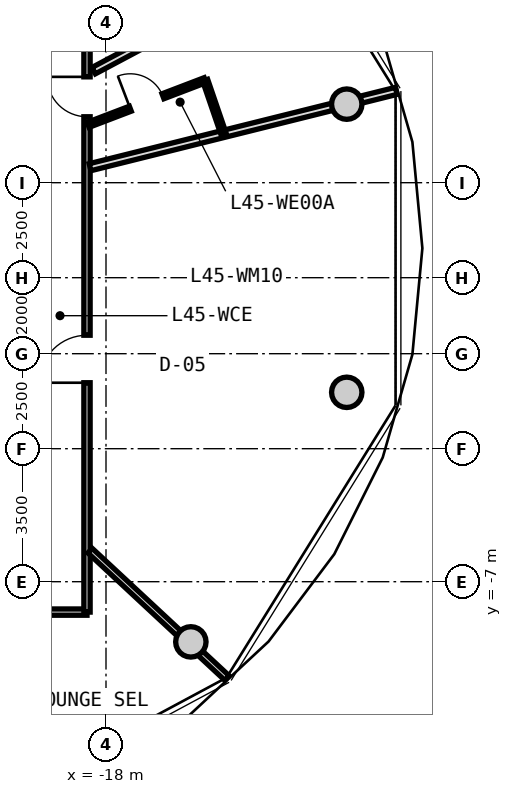
"""IFC4 building model, lengths in metres.
Left out: names, types, materials, properties, quantities, classifications, styles, units other than length and angle.
Written with IfcOpenShell. Run it as: python <this file> out.ifc"""

import sys

from ifc_helpers import new_model, si_unit, direction, frame, frame_2d, origin, origin_2d, place, context, subcontext, project, spatial, rectangle, circle, extrude, source, transform, mapped, element, fill, save


model = new_model("IFC4")
c1 = context("Model", 3, precision=1e-05, world=origin(), true_north=direction((0.0, 1.0)))
c2 = subcontext(c1, "Body", "Model", "MODEL_VIEW")
j1 = project(units=[si_unit("LENGTHUNIT", "METRE"), si_unit("PLANEANGLEUNIT", "RADIAN")], contexts=[c1])
p1 = place(None, origin())
s1 = spatial("IfcSite", under=j1, at=p1, CompositionType="ELEMENT")
p2 = place(p1, origin())
s2 = spatial("IfcBuilding", under=s1, at=p2, CompositionType="ELEMENT")
p3 = place(p2, frame((0.0, 0.0, 146.5)))
s3 = spatial("IfcBuildingStorey", under=s2, at=p3, CompositionType="ELEMENT", Elevation=146.5)
m1 = source(origin(), c2, "Body", "SweptSolid", [
    extrude(circle(Radius=0.4, at=origin_2d()), origin(), (0.0, 0.0, 1.0), 3.05),
])
for number, where, z_axis, x_axis in (
    (1, (-11.665, 5.567, 0.0), (0.0, 0.0, 1.0), (1.0, 0.0, 0.0)),
    (2, (-15.767, -8.584, 0.0), (0.0, 0.0, 1.0), (1.0, 0.0, 0.0)),
    (3, (-11.665, -2.016, 0.0), (0.0, 0.0, 1.0), (1.0, 0.0, 0.0)),
):
    element("IfcColumn", number, at=place(p3, frame(where, z_axis=z_axis, x_axis=x_axis)), inside=s3, PredefinedType="COLUMN", context=c2, shape_type="MappedRepresentation", body=[
        mapped(m1, transform((0.0, 0.0, 0.0), x_axis=(1.0, 0.0, 0.0), y_axis=(0.0, 1.0, 0.0), z_axis=(0.0, 0.0, 1.0), scale=1.0)),
    ])
m2 = source(origin(), c2, "Body", "SweptSolid", [
    extrude(rectangle(XDim=8.6, YDim=0.165, at=frame_2d((4.3, 0.0))), origin(), (0.0, 0.0, 1.0), 2.795),
])
p4 = place(p3, frame((-18.5, -7.8, 0.0), z_axis=(0.0, 0.0, 1.0), x_axis=(-1.0, 0.0, 0.0)))
e4 = element("IfcWall", 4, at=p4, inside=s3, PredefinedType="PARTITIONING", context=c2, shape_type="MappedRepresentation", body=[
    mapped(m2, transform((0.0, 0.0, 0.0), x_axis=(1.0, 0.0, 0.0), y_axis=(0.0, 1.0, 0.0), z_axis=(0.0, 0.0, 1.0), scale=1.0)),
])
p5 = place(p4, frame((3.775, 0.0, 0.0)))
e5 = element("IfcOpeningElement", 5, at=p5, cuts=e4, PredefinedType="OPENING", context=c2, shape_type="SweptSolid", body=[
    extrude(rectangle(XDim=1.05, YDim=2.15, at=frame_2d((0.525, 1.075))), frame((0.0, 0.093, 0.0), z_axis=(0.0, -1.0, 0.0), x_axis=(1.0, 0.0, 0.0)), (0.0, 0.0, 1.0), 0.185),
])
m3 = source(origin(), c2, "Body", "SweptSolid", [
    extrude(rectangle(XDim=15.6, YDim=0.165, at=frame_2d((7.8, 0.0))), origin(), (0.0, 0.0, 1.0), 2.795),
])
p6 = place(p3, frame((-18.5, 7.8, 0.0), z_axis=(0.0, 0.0, 1.0), x_axis=(0.0, -1.0, 0.0)))
e6 = element("IfcWall", 6, at=p6, inside=s3, PredefinedType="PARTITIONING", context=c2, shape_type="MappedRepresentation", body=[
    mapped(m3, transform((0.0, 0.0, 0.0), x_axis=(1.0, 0.0, 0.0), y_axis=(0.0, 1.0, 0.0), z_axis=(0.0, 0.0, 1.0), scale=1.0)),
])
p7 = place(p6, frame((8.314, 0.0, 0.0)))
e7 = element("IfcOpeningElement", 7, at=p7, cuts=e6, PredefinedType="OPENING", context=c2, shape_type="SweptSolid", body=[
    extrude(rectangle(XDim=1.25, YDim=2.2, at=frame_2d((0.625, 1.1))), frame((0.0, 0.093, 0.0), z_axis=(0.0, -1.0, 0.0), x_axis=(1.0, 0.0, 0.0)), (0.0, 0.0, 1.0), 0.185),
])
p8 = place(p6, frame((1.515, 0.0, 0.0)))
e8 = element("IfcOpeningElement", 8, at=p8, cuts=e6, PredefinedType="OPENING", context=c2, shape_type="SweptSolid", body=[
    extrude(rectangle(XDim=1.05, YDim=2.15, at=frame_2d((0.525, 1.075))), frame((0.0, 0.093, 0.0), z_axis=(0.0, -1.0, 0.0), x_axis=(1.0, 0.0, 0.0)), (0.0, 0.0, 1.0), 0.185),
])
m4 = source(origin(), c2, "Body", "SweptSolid", [
    extrude(rectangle(XDim=4.927, YDim=0.165, at=frame_2d((2.463, 0.0))), origin(), (0.0, 0.0, 1.0), 2.345),
])
p9 = place(p3, frame((-18.42, -6.183, 0.0), z_axis=(0.0, 0.0, 1.0), x_axis=(0.732191335987, -0.681098999783, 0.0)))
e9 = element("IfcWall", 9, at=p9, inside=s3, PredefinedType="PARTITIONING", context=c2, shape_type="MappedRepresentation", body=[
    mapped(m4, transform((0.0, 0.0, 0.0), x_axis=(1.0, 0.0, 0.0), y_axis=(0.0, 1.0, 0.0), z_axis=(0.0, 0.0, 1.0), scale=1.0)),
])
m5 = source(origin(), c2, "Body", "SweptSolid", [
    extrude(rectangle(XDim=8.305, YDim=0.19, at=frame_2d((4.153, 0.0))), origin(), (0.0, 0.0, 1.0), 2.345),
])
p10 = place(p3, frame((-18.42, 3.908, 0.0), z_axis=(0.0, 0.0, 1.0), x_axis=(0.970309994378, 0.241864662175, 0.0)))
e10 = element("IfcWall", 10, at=p10, inside=s3, PredefinedType="PARTITIONING", context=c2, shape_type="MappedRepresentation", body=[
    mapped(m5, transform((0.0, 0.0, 0.0), x_axis=(1.0, 0.0, 0.0), y_axis=(0.0, 1.0, 0.0), z_axis=(0.0, 0.0, 1.0), scale=1.0)),
])
m6 = source(origin(), c2, "Body", "SweptSolid", [
    extrude(rectangle(XDim=6.499, YDim=0.19, at=frame_2d((3.25, 0.0))), origin(), (0.0, 0.0, 1.0), 2.795),
])
p11 = place(p3, frame((-18.324, 6.449, 0.0), z_axis=(0.0, 0.0, 1.0), x_axis=(0.882715595921, 0.469907625729, 0.0)))
e11 = element("IfcWall", 11, at=p11, inside=s3, PredefinedType="PARTITIONING", context=c2, shape_type="MappedRepresentation", body=[
    mapped(m6, transform((0.0, 0.0, 0.0), x_axis=(1.0, 0.0, 0.0), y_axis=(0.0, 1.0, 0.0), z_axis=(0.0, 0.0, 1.0), scale=1.0)),
])
m7 = source(origin(), c2, "Body", "SweptSolid", [
    extrude(rectangle(XDim=3.295, YDim=0.14, at=frame_2d((1.647, 0.0))), origin(), (0.0, 0.0, 1.0), 2.795),
])
p12 = place(p3, frame((-18.47, 5.023, 0.0), z_axis=(0.0, 0.0, 1.0), x_axis=(0.934202224769, 0.356743890258, 0.0)))
e12 = element("IfcWall", 12, at=p12, inside=s3, PredefinedType="PARTITIONING", context=c2, shape_type="MappedRepresentation", body=[
    mapped(m7, transform((0.0, 0.0, 0.0), x_axis=(1.0, 0.0, 0.0), y_axis=(0.0, 1.0, 0.0), z_axis=(0.0, 0.0, 1.0), scale=1.0)),
])
p13 = place(p12, frame((1.188, 0.0, 0.0)))
e13 = element("IfcOpeningElement", 13, at=p13, cuts=e12, PredefinedType="OPENING", context=c2, shape_type="SweptSolid", body=[
    extrude(rectangle(XDim=0.92, YDim=2.1, at=frame_2d((0.46, 1.05))), frame((0.0, 0.08, 0.0), z_axis=(0.0, -1.0, 0.0), x_axis=(1.0, 0.0, 0.0)), (0.0, 0.0, 1.0), 0.16),
])
m8 = source(origin(), c2, "Body", "SweptSolid", [
    extrude(rectangle(XDim=1.479, YDim=0.14, at=frame_2d((0.739, 0.0))), origin(), (0.0, 0.0, 1.0), 2.795),
])
p14 = place(p3, frame((-15.392, 6.198, 0.0), z_axis=(0.0, 0.0, 1.0), x_axis=(0.324438293903, -0.945906862989, 0.0)))
e14 = element("IfcWall", 14, at=p14, inside=s3, PredefinedType="PARTITIONING", context=c2, shape_type="MappedRepresentation", body=[
    mapped(m8, transform((0.0, 0.0, 0.0), x_axis=(1.0, 0.0, 0.0), y_axis=(0.0, 1.0, 0.0), z_axis=(0.0, 0.0, 1.0), scale=1.0)),
])
m9 = source(origin(), c2, "Body", "SweptSolid", [
    extrude(rectangle(XDim=1.25, YDim=2.2, at=frame_2d((0.625, 1.1))), frame((0.0, 0.025, 0.0), z_axis=(0.0, -1.0, 0.0), x_axis=(1.0, 0.0, 0.0)), (0.0, 0.0, 1.0), 0.05),
])
p15 = place(p7, frame((1.25, 0.0, 0.0), z_axis=(0.0, 0.0, 1.0), x_axis=(-1.0, 0.0, 0.0)))
e15 = element("IfcDoor", 15, at=p15, inside=s3, OperationType="SINGLE_SWING_LEFT", PredefinedType="DOOR", context=c2, shape_type="MappedRepresentation", body=[
    mapped(m9, transform((0.0, 0.0, 0.0), x_axis=(1.0, 0.0, 0.0), y_axis=(0.0, 1.0, 0.0), z_axis=(0.0, 0.0, 1.0), scale=1.0)),
])
fill(e7, e15)
m10 = source(origin(), c2, "Body", "SweptSolid", [
    extrude(rectangle(XDim=1.05, YDim=2.15, at=frame_2d((0.525, 1.075))), frame((0.0, 0.025, 0.0), z_axis=(0.0, -1.0, 0.0), x_axis=(1.0, 0.0, 0.0)), (0.0, 0.0, 1.0), 0.05),
])
p16 = place(p8, frame((1.05, 0.0, 0.0), z_axis=(0.0, 0.0, 1.0), x_axis=(-1.0, 0.0, 0.0)))
e16 = element("IfcDoor", 16, at=p16, inside=s3, OperationType="SINGLE_SWING_RIGHT", PredefinedType="DOOR", context=c2, shape_type="MappedRepresentation", body=[
    mapped(m10, transform((0.0, 0.0, 0.0), x_axis=(1.0, 0.0, 0.0), y_axis=(0.0, 1.0, 0.0), z_axis=(0.0, 0.0, 1.0), scale=1.0)),
])
fill(e8, e16)
m11 = source(origin(), c2, "Body", "SweptSolid", [
    extrude(rectangle(XDim=0.92, YDim=2.1, at=frame_2d((0.46, 1.05))), frame((0.0, 0.025, 0.0), z_axis=(0.0, -1.0, 0.0), x_axis=(1.0, 0.0, 0.0)), (0.0, 0.0, 1.0), 0.05),
])
p17 = place(p13, origin())
e17 = element("IfcDoor", 17, at=p17, inside=s3, OperationType="SINGLE_SWING_LEFT", PredefinedType="DOOR", context=c2, shape_type="MappedRepresentation", body=[
    mapped(m11, transform((0.0, 0.0, 0.0), x_axis=(1.0, 0.0, 0.0), y_axis=(0.0, 1.0, 0.0), z_axis=(0.0, 0.0, 1.0), scale=1.0)),
])
fill(e13, e17)
save(model, sys.argv[1])
